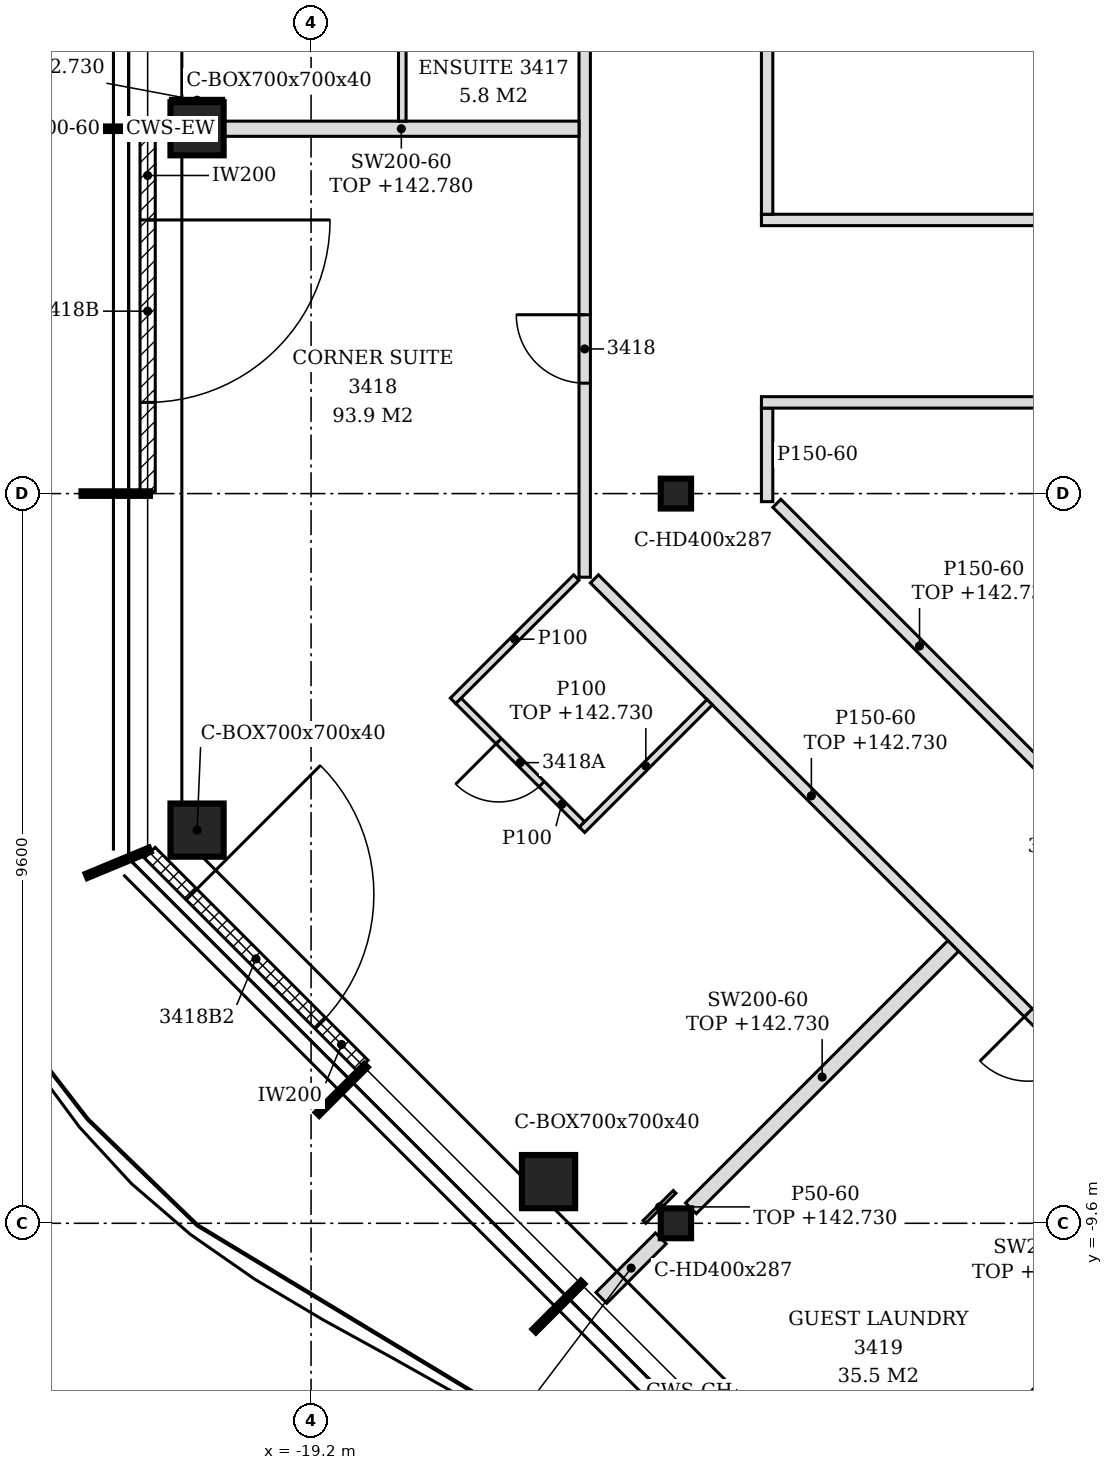
"""IFC4 building model, lengths in metres.
Left out: names, types, materials, properties, quantities, classifications, styles, units other than length and angle.
Written with IfcOpenShell. Run it as: python <this file> out.ifc"""

import sys

from ifc_helpers import new_model, si_unit, direction, frame, frame_2d, origin, origin_2d, place, context, subcontext, project, spatial, polyline, rectangle, hollow_rectangle, i_section, outline, extrude, element, fill, save


model = new_model("IFC4")
c1 = context("Model", 3, precision=1e-05, world=origin(), true_north=direction((0.0, 1.0)))
c2 = subcontext(c1, "Body", "Model", "MODEL_VIEW")
j1 = project(units=[si_unit("LENGTHUNIT", "METRE"), si_unit("PLANEANGLEUNIT", "RADIAN")], contexts=[c1])
p1 = place(None, origin())
s1 = spatial("IfcSite", under=j1, at=p1, CompositionType="ELEMENT")
p2 = place(p1, origin())
s2 = spatial("IfcBuilding", under=s1, at=p2, CompositionType="ELEMENT")
p3 = place(p2, frame((0.0, 0.0, 139.8)))
s3 = spatial("IfcBuildingStorey", under=s2, at=p3, CompositionType="ELEMENT", Elevation=139.8)
for number, where, z_axis, x_axis in (
    (1, (-20.7, 4.8, -0.15), (0.0, 0.0, 1.0), (1.0, 0.0, 0.0)),
    (2, (-20.7, -4.427, -0.15), (0.0, 0.0, 1.0), (1.0, 0.0, 0.0)),
    (3, (-16.076, -9.052, -0.15), (0.0, 0.0, 1.0), (1.0, 0.0, 0.0)),
):
    element("IfcColumn", number, at=place(p3, frame(where, z_axis=z_axis, x_axis=x_axis)), inside=s3, PredefinedType="COLUMN", context=c2, shape_type="SweptSolid", body=[
        extrude(hollow_rectangle(XDim=0.7, YDim=0.7, WallThickness=0.04, at=origin_2d()), origin(), (0.0, 0.0, 1.0), 3.6),
    ])
for number, where, z_axis, x_axis in (
    (4, (-14.4, -9.6, -0.15), (0.0, 0.0, 1.0), (1.0, 0.0, 0.0)),
    (5, (-14.4, 0.0, -0.15), (0.0, 0.0, 1.0), (1.0, 0.0, 0.0)),
):
    element("IfcColumn", number, at=place(p3, frame(where, z_axis=z_axis, x_axis=x_axis)), inside=s3, PredefinedType="COLUMN", context=c2, shape_type="SweptSolid", body=[
        extrude(i_section(OverallWidth=0.399, OverallDepth=0.393, WebThickness=0.023, FlangeThickness=0.037, FilletRadius=0.015, at=origin_2d()), origin(), (0.0, 0.0, 1.0), 3.6),
    ])
p4 = place(p3, frame((-21.35, 4.77, 0.0), z_axis=(0.0, 0.0, 1.0), x_axis=(0.0, -1.0, 0.0)))
e6 = element("IfcWall", 6, at=p4, inside=s3, PredefinedType="NOTDEFINED", context=c2, shape_type="SweptSolid", body=[
    extrude(rectangle(XDim=4.74, YDim=0.2, at=frame_2d((2.37, 0.0))), origin(), (0.0, 0.0, 1.0), 3.45),
])
p5 = place(p4, frame((1.17, 0.0, 0.0)))
e7 = element("IfcOpeningElement", 7, at=p5, cuts=e6, PredefinedType="OPENING", context=c2, shape_type="SweptSolid", body=[
    extrude(rectangle(XDim=2.4, YDim=2.4, at=frame_2d((1.2, 1.2))), frame((0.0, 0.11, 0.0), z_axis=(0.0, -1.0, 0.0), x_axis=(1.0, 0.0, 0.0)), (0.0, 0.0, 1.0), 0.22),
])
p6 = place(p3, frame((-21.322, -4.725, 0.0), z_axis=(0.0, 0.0, 1.0), x_axis=(0.707106781187, -0.707106781187, 0.0)))
e8 = element("IfcWall", 8, at=p6, inside=s3, PredefinedType="NOTDEFINED", context=c2, shape_type="SweptSolid", body=[
    extrude(rectangle(XDim=3.962, YDim=0.2, at=frame_2d((1.981, 0.0))), origin(), (0.0, 0.0, 1.0), 3.45),
])
p7 = place(p6, frame((0.775, 0.0, 0.0)))
e9 = element("IfcOpeningElement", 9, at=p7, cuts=e8, PredefinedType="OPENING", context=c2, shape_type="SweptSolid", body=[
    extrude(rectangle(XDim=2.4, YDim=2.4, at=frame_2d((1.2, 1.2))), frame((0.0, 0.11, 0.0), z_axis=(0.0, -1.0, 0.0), x_axis=(1.0, 0.0, 0.0)), (0.0, 0.0, 1.0), 0.22),
])
p8 = place(p3, frame((-11.102, -13.326, 0.0), z_axis=(0.0, 0.0, 1.0), x_axis=(0.707088722709, 0.707124839203, 0.0)))
e10 = element("IfcWall", 10, at=p8, inside=s3, PredefinedType="PARTITIONING", context=c2, shape_type="SweptSolid", body=[
    extrude(rectangle(XDim=6.76, YDim=0.2, at=frame_2d((3.38, 0.0))), origin(), (0.0, 0.0, 1.0), 2.93),
])
p9 = place(p3, frame((-15.381, -10.581, 0.0), z_axis=(0.0, 0.0, 1.0), x_axis=(0.707217034054, 0.706996511125, 0.0)))
e11 = element("IfcWall", 11, at=p9, inside=s3, PredefinedType="PARTITIONING", context=c2, shape_type="SweptSolid", body=[
    extrude(rectangle(XDim=1.107, YDim=0.2, at=frame_2d((0.554, 0.0))), origin(), (0.0, 0.0, 1.0), 2.63),
])
p10 = place(p3, frame((-14.202, -9.402, 0.0), z_axis=(0.0, 0.0, 1.0), x_axis=(0.707081776084, 0.707131785404, 0.0)))
e12 = element("IfcWall", 12, at=p10, inside=s3, PredefinedType="PARTITIONING", context=c2, shape_type="SweptSolid", body=[
    extrude(rectangle(XDim=4.882, YDim=0.2, at=frame_2d((2.441, 0.0))), origin(), (0.0, 0.0, 1.0), 2.93),
])
p11 = place(p3, frame((-8.322, -8.272, 0.0), z_axis=(0.0, 0.0, 1.0), x_axis=(-0.707106781187, 0.707106781187, 0.0)))
e13 = element("IfcWall", 13, at=p11, inside=s3, PredefinedType="PARTITIONING", context=c2, shape_type="SweptSolid", body=[
    extrude(rectangle(XDim=10.112, YDim=0.15, at=frame_2d((5.056, 0.0))), origin(), (0.0, 0.0, 1.0), 2.93),
])
p12 = place(p11, frame((1.139, 0.0, 0.0)))
e14 = element("IfcOpeningElement", 14, at=p12, cuts=e13, PredefinedType="OPENING", context=c2, shape_type="SweptSolid", body=[
    extrude(rectangle(XDim=0.9, YDim=2.1, at=frame_2d((0.45, 1.05))), frame((0.0, 0.085, 0.0), z_axis=(0.0, -1.0, 0.0), x_axis=(1.0, 0.0, 0.0)), (0.0, 0.0, 1.0), 0.17),
])
p13 = place(p3, frame((-5.009, -8.191, 0.0), z_axis=(0.0, 0.0, 1.0), x_axis=(-0.707106781187, 0.707106781187, 0.0)))
e15 = element("IfcWall", 15, at=p13, inside=s3, PredefinedType="PARTITIONING", context=c2, shape_type="SweptSolid", body=[
    extrude(rectangle(XDim=11.404, YDim=0.15, at=frame_2d((5.702, 0.0))), origin(), (0.0, 0.0, 1.0), 2.93),
])
p14 = place(p13, frame((5.195, 0.0, 0.0)))
e16 = element("IfcOpeningElement", 16, at=p14, cuts=e15, PredefinedType="OPENING", context=c2, shape_type="SweptSolid", body=[
    extrude(rectangle(XDim=0.9, YDim=2.1, at=frame_2d((0.45, 1.05))), frame((0.0, 0.085, 0.0), z_axis=(0.0, -1.0, 0.0), x_axis=(1.0, 0.0, 0.0)), (0.0, 0.0, 1.0), 0.17),
])
p15 = place(p3, frame((-15.635, -4.353, 0.0), z_axis=(0.0, 0.0, 1.0), x_axis=(-0.707106781187, 0.707106781187, 0.0)))
e17 = element("IfcWall", 17, at=p15, inside=s3, PredefinedType="PARTITIONING", context=c2, shape_type="SweptSolid", body=[
    extrude(rectangle(XDim=2.3, YDim=0.1, at=frame_2d((1.15, 0.0))), origin(), (0.0, 0.0, 1.0), 3.45),
])
p16 = place(p15, frame((0.75, 0.0, 0.0)))
e18 = element("IfcOpeningElement", 18, at=p16, cuts=e17, PredefinedType="OPENING", context=c2, shape_type="SweptSolid", body=[
    extrude(rectangle(XDim=0.8, YDim=2.1, at=frame_2d((0.4, 1.05))), frame((0.0, 0.06, 0.0), z_axis=(0.0, -1.0, 0.0), x_axis=(1.0, 0.0, 0.0)), (0.0, 0.0, 1.0), 0.12),
])
p17 = place(p3, frame((-15.635, -4.423, 0.0), z_axis=(0.0, 0.0, 1.0), x_axis=(0.707106781187, 0.707106781187, 0.0)))
e19 = element("IfcWall", 19, at=p17, inside=s3, PredefinedType="PARTITIONING", context=c2, shape_type="SweptSolid", body=[
    extrude(rectangle(XDim=2.375, YDim=0.1, at=frame_2d((1.188, 0.0))), origin(), (0.0, 0.0, 1.0), 2.93),
])
p18 = place(p3, frame((-17.333, -2.726, 0.0), z_axis=(0.0, 0.0, 1.0), x_axis=(0.707159989116, 0.707053569253, 0.0)))
e20 = element("IfcWall", 20, at=p18, inside=s3, PredefinedType="PARTITIONING", context=c2, shape_type="SweptSolid", body=[
    extrude(rectangle(XDim=2.294, YDim=0.1, at=frame_2d((1.147, 0.0))), origin(), (0.0, 0.0, 1.0), 3.45),
])
p19 = place(p3, frame((-15.6, -1.1, 0.0), z_axis=(0.0, 0.0, 1.0), x_axis=(0.0, 1.0, 0.0)))
e21 = element("IfcWall", 21, at=p19, inside=s3, PredefinedType="PARTITIONING", context=c2, shape_type="SweptSolid", body=[
    extrude(outline(polyline([(0.0, 0.0), (12.834, 0.0), (12.834, 3.45), (10.795, 3.45), (10.793, 2.98), (10.605, 2.98), (10.603, 3.45), (5.995, 3.45), (5.993, 2.98), (5.805, 2.98), (5.803, 3.45), (1.195, 3.45), (1.193, 2.98), (1.005, 2.98), (1.003, 3.45), (0.0, 3.45), (0.0, 0.0)])), frame((0.0, 0.075, 0.0), z_axis=(0.0, -1.0, 0.0), x_axis=(1.0, 0.0, 0.0)), (0.0, 0.0, 1.0), 0.15),
])
p20 = place(p19, frame((2.553, 0.0, 0.0)))
e22 = element("IfcOpeningElement", 22, at=p20, cuts=e21, PredefinedType="OPENING", context=c2, shape_type="SweptSolid", body=[
    extrude(rectangle(XDim=0.9, YDim=2.1, at=frame_2d((0.45, 1.05))), frame((0.0, 0.085, 0.0), z_axis=(0.0, -1.0, 0.0), x_axis=(1.0, 0.0, 0.0)), (0.0, 0.0, 1.0), 0.17),
])
p21 = place(p3, frame((-13.2, -0.106, 0.0), z_axis=(0.0, 0.0, 1.0), x_axis=(0.0, 1.0, 0.0)))
e23 = element("IfcWall", 23, at=p21, inside=s3, PredefinedType="PARTITIONING", context=c2, shape_type="SweptSolid", body=[
    extrude(outline(polyline([(0.0, 0.0), (1.231, 0.0), (1.231, 3.45), (0.206, 3.45), (0.204, 2.93), (0.006, 2.93), (0.004, 3.45), (0.0, 3.45), (0.0, 0.0)])), frame((0.0, 0.075, 0.0), z_axis=(0.0, -1.0, 0.0), x_axis=(1.0, 0.0, 0.0)), (0.0, 0.0, 1.0), 0.15),
])
for number, where, z_axis, x_axis in (
    (24, (-13.275, 1.2, 0.0), (0.0, 0.0, 1.0), (1.0, 0.0, 0.0)),
    (25, (-13.275, 3.6, 0.0), (0.0, 0.0, 1.0), (1.0, 0.0, 0.0)),
):
    element("IfcWall", number, at=place(p3, frame(where, z_axis=z_axis, x_axis=x_axis)), inside=s3, PredefinedType="PARTITIONING", context=c2, shape_type="SweptSolid", body=[
        extrude(outline(polyline([(0.0, 0.0), (8.55, 0.0), (8.55, 2.83), (8.325, 2.83), (8.323, 3.45), (0.0, 3.45), (0.0, 0.0)])), frame((0.0, 0.075, 0.0), z_axis=(0.0, -1.0, 0.0), x_axis=(1.0, 0.0, 0.0)), (0.0, 0.0, 1.0), 0.15),
    ])
p22 = place(p3, frame((-13.2, 3.675, 0.0), z_axis=(0.0, 0.0, 1.0), x_axis=(0.0, 1.0, 0.0)))
e26 = element("IfcWall", 26, at=p22, inside=s3, PredefinedType="PARTITIONING", context=c2, shape_type="SweptSolid", body=[
    extrude(outline(polyline([(0.0, 0.0), (7.065, 0.0), (7.065, 3.45), (6.025, 3.45), (6.023, 2.93), (5.825, 2.93), (5.823, 3.45), (1.225, 3.45), (1.223, 2.93), (1.025, 2.93), (1.023, 3.45), (0.0, 3.45), (0.0, 0.0)])), frame((0.0, 0.075, 0.0), z_axis=(0.0, -1.0, 0.0), x_axis=(1.0, 0.0, 0.0)), (0.0, 0.0, 1.0), 0.15),
])
p23 = place(p3, frame((-21.25, 4.8, 0.0), z_axis=(0.0, 0.0, 1.0), x_axis=(1.0, 0.0, 0.0)))
e27 = element("IfcWall", 27, at=p23, inside=s3, PredefinedType="PARTITIONING", context=c2, shape_type="SweptSolid", body=[
    extrude(rectangle(XDim=0.2, YDim=0.2, at=frame_2d((0.1, 0.0))), origin(), (0.0, 0.0, 1.0), 3.45),
])
p24 = place(p3, frame((-20.35, 4.8, 0.0), z_axis=(0.0, 0.0, 1.0), x_axis=(1.0, 0.0, 0.0)))
e28 = element("IfcWall", 28, at=p24, inside=s3, PredefinedType="PARTITIONING", context=c2, shape_type="SweptSolid", body=[
    extrude(rectangle(XDim=4.675, YDim=0.2, at=frame_2d((2.337, 0.0))), origin(), (0.0, 0.0, 1.0), 2.98),
])
p25 = place(p3, frame((-18.0, 4.9, 0.0), z_axis=(0.0, 0.0, 1.0), x_axis=(0.0, 1.0, 0.0)))
e29 = element("IfcWall", 29, at=p25, inside=s3, PredefinedType="PARTITIONING", context=c2, shape_type="SweptSolid", body=[
    extrude(rectangle(XDim=2.25, YDim=0.1, at=frame_2d((1.125, 0.0))), origin(), (0.0, 0.0, 1.0), 3.45),
])
p26 = place(p3, frame((-14.814, -9.582, 0.0), z_axis=(0.0, 0.0, 1.0), x_axis=(0.707106781187, 0.707106781187, 0.0)))
e30 = element("IfcWall", 30, at=p26, inside=s3, PredefinedType="PARTITIONING", context=c2, shape_type="SweptSolid", body=[
    extrude(rectangle(XDim=0.56, YDim=0.05, at=frame_2d((0.28, 0.0))), origin(), (0.0, 0.0, 1.0), 2.93),
])
p27 = place(p3, frame((-21.05, 5.175, 0.0), z_axis=(0.0, 0.0, 1.0), x_axis=(1.0, 0.0, 0.0)))
e31 = element("IfcWall", 31, at=p27, inside=s3, PredefinedType="PARTITIONING", context=c2, shape_type="SweptSolid", body=[
    extrude(rectangle(XDim=0.7, YDim=0.05, at=frame_2d((0.35, 0.0))), origin(), (0.0, 0.0, 1.0), 2.93),
])
p28 = place(p5, origin())
e32 = element("IfcDoor", 32, at=p28, inside=s3, OperationType="SINGLE_SWING_LEFT", PredefinedType="DOOR", context=c2, shape_type="SweptSolid", body=[
    extrude(rectangle(XDim=2.4, YDim=2.4, at=frame_2d((1.2, 1.2))), frame((0.0, 0.025, 0.0), z_axis=(0.0, -1.0, 0.0), x_axis=(1.0, 0.0, 0.0)), (0.0, 0.0, 1.0), 0.05),
])
fill(e7, e32)
p29 = place(p7, origin())
e33 = element("IfcDoor", 33, at=p29, inside=s3, OperationType="SINGLE_SWING_LEFT", PredefinedType="DOOR", context=c2, shape_type="SweptSolid", body=[
    extrude(rectangle(XDim=2.4, YDim=2.4, at=frame_2d((1.2, 1.2))), frame((0.0, 0.025, 0.0), z_axis=(0.0, -1.0, 0.0), x_axis=(1.0, 0.0, 0.0)), (0.0, 0.0, 1.0), 0.05),
])
fill(e9, e33)
p30 = place(p20, origin())
e34 = element("IfcDoor", 34, at=p30, inside=s3, OperationType="SINGLE_SWING_RIGHT", PredefinedType="DOOR", context=c2, shape_type="SweptSolid", body=[
    extrude(rectangle(XDim=0.9, YDim=2.1, at=frame_2d((0.45, 1.05))), frame((0.0, 0.025, 0.0), z_axis=(0.0, -1.0, 0.0), x_axis=(1.0, 0.0, 0.0)), (0.0, 0.0, 1.0), 0.05),
])
fill(e22, e34)
p31 = place(p16, origin())
e35 = element("IfcDoor", 35, at=p31, inside=s3, OperationType="SINGLE_SWING_RIGHT", PredefinedType="DOOR", context=c2, shape_type="SweptSolid", body=[
    extrude(rectangle(XDim=0.8, YDim=2.1, at=frame_2d((0.4, 1.05))), frame((0.0, 0.025, 0.0), z_axis=(0.0, -1.0, 0.0), x_axis=(1.0, 0.0, 0.0)), (0.0, 0.0, 1.0), 0.05),
])
fill(e18, e35)
p32 = place(p12, origin())
e36 = element("IfcDoor", 36, at=p32, inside=s3, OperationType="SINGLE_SWING_RIGHT", PredefinedType="DOOR", context=c2, shape_type="SweptSolid", body=[
    extrude(rectangle(XDim=0.9, YDim=2.1, at=frame_2d((0.45, 1.05))), frame((0.0, 0.025, 0.0), z_axis=(0.0, -1.0, 0.0), x_axis=(1.0, 0.0, 0.0)), (0.0, 0.0, 1.0), 0.05),
])
fill(e14, e36)
save(model, sys.argv[1])
